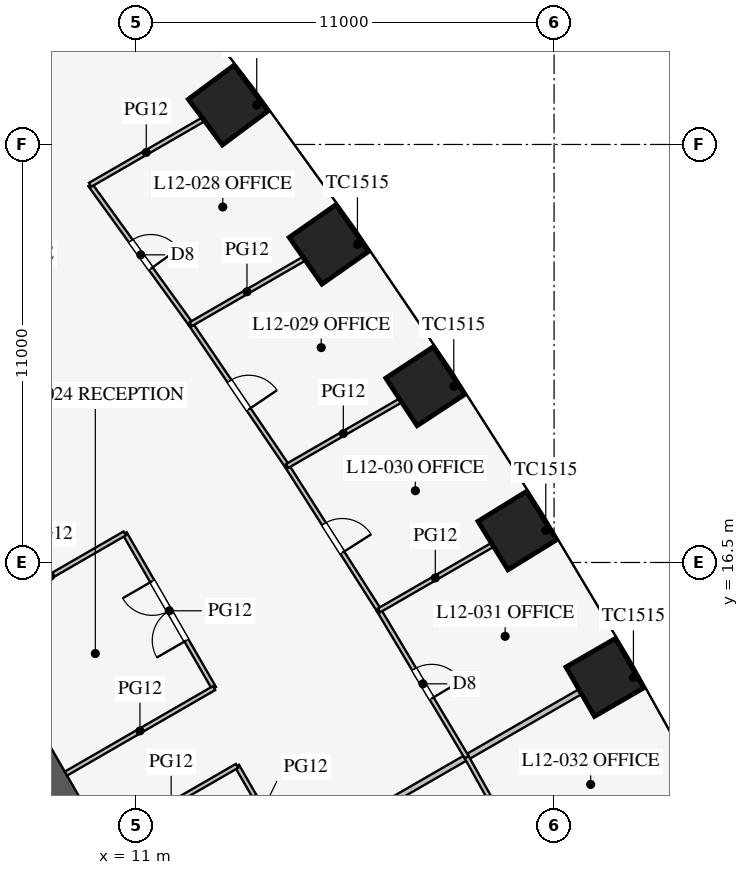
"""IFC4 building model, lengths in metres.
Left out: names, types, materials, properties, quantities, classifications, styles, units other than length and angle.
Written with IfcOpenShell. Run it as: python <this file> out.ifc"""

import sys

from ifc_helpers import new_model, si_unit, direction, frame, frame_2d, origin, origin_2d, place, context, subcontext, project, spatial, rectangle, extrude, element, fill, save


model = new_model("IFC4")
c1 = context("Model", 3, precision=1e-05, world=origin(), true_north=direction((0.0, 1.0)))
c2 = subcontext(c1, "Body", "Model", "MODEL_VIEW")
j1 = project(units=[si_unit("LENGTHUNIT", "METRE"), si_unit("PLANEANGLEUNIT", "RADIAN")], contexts=[c1])
p1 = place(None, origin())
s1 = spatial("IfcSite", under=j1, at=p1, CompositionType="ELEMENT")
p2 = place(p1, origin())
s2 = spatial("IfcBuilding", under=s1, at=p2, CompositionType="ELEMENT")
p3 = place(p2, frame((0.0, 0.0, 54.3)))
s3 = spatial("IfcBuildingStorey", under=s2, at=p3, CompositionType="ELEMENT", Elevation=54.3)
for number, where, z_axis, x_axis in (
    (1, (25.531, 9.544, 0.0), (0.0, 0.0, 1.0), (-0.475, 0.88, 0.0)),
    (2, (23.338, 13.474, 0.0), (0.0, 0.0, 1.0), (-0.5, 0.866, 0.0)),
    (3, (21.031, 17.339, 0.0), (0.0, 0.0, 1.0), (-0.525, 0.851, 0.0)),
    (4, (18.611, 21.137, 0.0), (0.0, 0.0, 1.0), (-0.549, 0.836, 0.0)),
    (5, (16.076, 24.87, 0.0), (0.0, 0.0, 1.0), (-0.574, 0.819, 0.0)),
    (6, (13.426, 28.536, 0.0), (0.0, 0.0, 1.0), (-0.597, 0.802, 0.0)),
):
    element("IfcColumn", number, at=place(p3, frame(where, z_axis=z_axis, x_axis=x_axis)), inside=s3, PredefinedType="COLUMN", context=c2, shape_type="SweptSolid", body=[
        extrude(rectangle(XDim=1.5, YDim=1.5, at=origin_2d()), origin(), (0.0, 0.0, 1.0), 4.2),
    ])
p4 = place(p3, frame((16.743, -3.0, 0.0), z_axis=(0.0, 0.0, 1.0), x_axis=(-0.500002442456, 0.866023993627, 0.0)))
e7 = element("IfcWall", 7, at=p4, inside=s3, PredefinedType="SHEAR", context=c2, shape_type="SweptSolid", body=[
    extrude(rectangle(XDim=21.939, YDim=0.8, at=frame_2d((10.97, 0.0))), origin(), (0.0, 0.0, 1.0), 4.2),
])
p5 = place(p4, frame((17.27, 0.0, 0.0)))
e8 = element("IfcOpeningElement", 8, at=p5, cuts=e7, PredefinedType="OPENING", context=c2, shape_type="SweptSolid", body=[
    extrude(rectangle(XDim=1.2, YDim=2.1, at=frame_2d((0.6, 1.05))), frame((0.0, 0.41, 0.0), z_axis=(0.0, -1.0, 0.0), x_axis=(1.0, 0.0, 0.0)), (0.0, 0.0, 1.0), 0.82),
])
p6 = place(p4, frame((3.47, 0.0, 0.0)))
e9 = element("IfcOpeningElement", 9, at=p6, cuts=e7, PredefinedType="OPENING", context=c2, shape_type="SweptSolid", body=[
    extrude(rectangle(XDim=1.2, YDim=2.1, at=frame_2d((0.6, 1.05))), frame((0.0, 0.41, 0.0), z_axis=(0.0, -1.0, 0.0), x_axis=(1.0, 0.0, 0.0)), (0.0, 0.0, 1.0), 0.82),
])
p7 = place(p3, frame((11.613, 6.705, 0.0), z_axis=(0.0, 0.0, 1.0), x_axis=(0.86602785495, 0.499995754432, 0.0)))
e10 = element("IfcWall", 10, at=p7, inside=s3, PredefinedType="PARTITIONING", context=c2, shape_type="SweptSolid", body=[
    extrude(rectangle(XDim=12.759, YDim=0.15, at=frame_2d((6.379, 0.0))), origin(), (0.0, 0.0, 1.0), 3.2),
])
p8 = place(p3, frame((15.006, 8.808, 0.0), z_axis=(0.0, 0.0, 1.0), x_axis=(-0.500048589285, 0.86599734893, 0.0)))
e11 = element("IfcWall", 11, at=p8, inside=s3, PredefinedType="PARTITIONING", context=c2, shape_type="SweptSolid", body=[
    extrude(rectangle(XDim=2.7, YDim=0.12, at=frame_2d((1.35, 0.0))), origin(), (0.0, 0.0, 1.0), 2.9),
])
p9 = place(p8, frame((0.9, 0.0, 0.15)))
e12 = element("IfcOpeningElement", 12, at=p9, cuts=e11, PredefinedType="OPENING", context=c2, shape_type="SweptSolid", body=[
    extrude(rectangle(XDim=0.9, YDim=2.1, at=frame_2d((0.45, 1.05))), frame((0.0, 0.07, 0.0), z_axis=(0.0, -1.0, 0.0), x_axis=(1.0, 0.0, 0.0)), (0.0, 0.0, 1.0), 0.14),
])
p10 = place(p3, frame((13.052, 13.194, 0.0), z_axis=(0.0, 0.0, 1.0), x_axis=(-0.499977259774, 0.866038532462, 0.0)))
e13 = element("IfcWall", 13, at=p10, inside=s3, PredefinedType="PARTITIONING", context=c2, shape_type="SweptSolid", body=[
    extrude(rectangle(XDim=4.7, YDim=0.12, at=frame_2d((2.35, 0.0))), origin(), (0.0, 0.0, 1.0), 2.9),
])
p11 = place(p10, frame((1.45, 0.0, 0.15)))
e14 = element("IfcOpeningElement", 14, at=p11, cuts=e13, PredefinedType="OPENING", context=c2, shape_type="SweptSolid", body=[
    extrude(rectangle(XDim=1.8, YDim=2.1, at=frame_2d((0.9, 1.05))), frame((0.0, 0.07, 0.0), z_axis=(0.0, -1.0, 0.0), x_axis=(1.0, 0.0, 0.0)), (0.0, 0.0, 1.0), 0.14),
])
p12 = place(p3, frame((10.192, 9.146, 0.0), z_axis=(0.0, 0.0, 1.0), x_axis=(0.866026010844, 0.49999894854, 0.0)))
e15 = element("IfcWall", 15, at=p12, inside=s3, PredefinedType="PARTITIONING", context=c2, shape_type="SweptSolid", body=[
    extrude(rectangle(XDim=4.0, YDim=0.12, at=frame_2d((2.0, 0.0))), origin(), (0.0, 0.0, 1.0), 2.9),
])
p13 = place(p3, frame((9.155, 10.944, 0.0), z_axis=(0.0, 0.0, 1.0), x_axis=(0.866017533419, 0.500013631625, 0.0)))
e16 = element("IfcWall", 16, at=p13, inside=s3, PredefinedType="PARTITIONING", context=c2, shape_type="SweptSolid", body=[
    extrude(rectangle(XDim=4.5, YDim=0.12, at=frame_2d((2.25, 0.0))), origin(), (0.0, 0.0, 1.0), 2.9),
])
p14 = place(p3, frame((6.805, 15.014, 0.0), z_axis=(0.0, 0.0, 1.0), x_axis=(0.866031096941, 0.499990139034, 0.0)))
e17 = element("IfcWall", 17, at=p14, inside=s3, PredefinedType="PARTITIONING", context=c2, shape_type="SweptSolid", body=[
    extrude(rectangle(XDim=4.5, YDim=0.12, at=frame_2d((2.25, 0.0))), origin(), (0.0, 0.0, 1.0), 2.9),
])
p15 = place(p3, frame((19.701, 11.374, 0.0), z_axis=(0.0, 0.0, 1.0), x_axis=(-0.512483962191, 0.858696796604, 0.0)))
e18 = element("IfcWall", 18, at=p15, inside=s3, PredefinedType="PARTITIONING", context=c2, shape_type="SweptSolid", body=[
    extrude(rectangle(XDim=4.5, YDim=0.12, at=frame_2d((2.25, 0.0))), origin(), (0.0, 0.0, 1.0), 2.9),
])
p16 = place(p15, frame((1.8, 0.0, 0.15)))
e19 = element("IfcOpeningElement", 19, at=p16, cuts=e18, PredefinedType="OPENING", context=c2, shape_type="SweptSolid", body=[
    extrude(rectangle(XDim=0.9, YDim=2.1, at=frame_2d((0.45, 1.05))), frame((0.0, 0.07, 0.0), z_axis=(0.0, -1.0, 0.0), x_axis=(1.0, 0.0, 0.0)), (0.0, 0.0, 1.0), 0.14),
])
p17 = place(p3, frame((12.441, 22.771, 0.0), z_axis=(0.0, 0.0, 1.0), x_axis=(-0.585376255171, 0.810761765183, 0.0)))
e20 = element("IfcWall", 20, at=p17, inside=s3, PredefinedType="PARTITIONING", context=c2, shape_type="SweptSolid", body=[
    extrude(rectangle(XDim=4.523, YDim=0.12, at=frame_2d((2.262, 0.0))), origin(), (0.0, 0.0, 1.0), 2.9),
])
p18 = place(p17, frame((1.8, 0.0, 0.15)))
e21 = element("IfcOpeningElement", 21, at=p18, cuts=e20, PredefinedType="OPENING", context=c2, shape_type="SweptSolid", body=[
    extrude(rectangle(XDim=0.9, YDim=2.1, at=frame_2d((0.45, 1.05))), frame((0.0, 0.07, 0.0), z_axis=(0.0, -1.0, 0.0), x_axis=(1.0, 0.0, 0.0)), (0.0, 0.0, 1.0), 0.14),
])
p19 = place(p3, frame((17.395, 15.239, 0.0), z_axis=(0.0, 0.0, 1.0), x_axis=(-0.537243691336, 0.843427066272, 0.0)))
e22 = element("IfcWall", 22, at=p19, inside=s3, PredefinedType="PARTITIONING", context=c2, shape_type="SweptSolid", body=[
    extrude(rectangle(XDim=4.504, YDim=0.12, at=frame_2d((2.252, 0.0))), origin(), (0.0, 0.0, 1.0), 2.9),
])
p20 = place(p19, frame((1.8, 0.0, 0.15)))
e23 = element("IfcOpeningElement", 23, at=p20, cuts=e22, PredefinedType="OPENING", context=c2, shape_type="SweptSolid", body=[
    extrude(rectangle(XDim=0.9, YDim=2.1, at=frame_2d((0.45, 1.05))), frame((0.0, 0.07, 0.0), z_axis=(0.0, -1.0, 0.0), x_axis=(1.0, 0.0, 0.0)), (0.0, 0.0, 1.0), 0.14),
])
p21 = place(p3, frame((14.975, 19.038, 0.0), z_axis=(0.0, 0.0, 1.0), x_axis=(-0.561512004239, 0.827468591002, 0.0)))
e24 = element("IfcWall", 24, at=p21, inside=s3, PredefinedType="PARTITIONING", context=c2, shape_type="SweptSolid", body=[
    extrude(rectangle(XDim=4.512, YDim=0.12, at=frame_2d((2.256, 0.0))), origin(), (0.0, 0.0, 1.0), 2.9),
])
p22 = place(p21, frame((1.8, 0.0, 0.15)))
e25 = element("IfcOpeningElement", 25, at=p22, cuts=e24, PredefinedType="OPENING", context=c2, shape_type="SweptSolid", body=[
    extrude(rectangle(XDim=0.9, YDim=2.1, at=frame_2d((0.45, 1.05))), frame((0.0, 0.07, 0.0), z_axis=(0.0, -1.0, 0.0), x_axis=(1.0, 0.0, 0.0)), (0.0, 0.0, 1.0), 0.14),
])
p23 = place(p3, frame((21.895, 7.445, 0.0), z_axis=(0.0, 0.0, 1.0), x_axis=(-0.487415216275, 0.87317031955, 0.0)))
e26 = element("IfcWall", 26, at=p23, inside=s3, PredefinedType="PARTITIONING", context=c2, shape_type="SweptSolid", body=[
    extrude(rectangle(XDim=4.5, YDim=0.12, at=frame_2d((2.25, 0.0))), origin(), (0.0, 0.0, 1.0), 2.9),
])
p24 = place(p23, frame((1.8, 0.0, 0.15)))
e27 = element("IfcOpeningElement", 27, at=p24, cuts=e26, PredefinedType="OPENING", context=c2, shape_type="SweptSolid", body=[
    extrude(rectangle(XDim=0.9, YDim=2.1, at=frame_2d((0.45, 1.05))), frame((0.0, 0.07, 0.0), z_axis=(0.0, -1.0, 0.0), x_axis=(1.0, 0.0, 0.0)), (0.0, 0.0, 1.0), 0.14),
])
p25 = place(p3, frame((12.441, 22.771, 0.0), z_axis=(0.0, 0.0, 1.0), x_axis=(0.866016478054, 0.500015459501, 0.0)))
e28 = element("IfcWall", 28, at=p25, inside=s3, PredefinedType="PARTITIONING", context=c2, shape_type="SweptSolid", body=[
    extrude(rectangle(XDim=3.414, YDim=0.12, at=frame_2d((1.707, 0.0))), origin(), (0.0, 0.0, 1.0), 2.9),
])
p26 = place(p3, frame((9.793, 26.439, 0.0), z_axis=(0.0, 0.0, 1.0), x_axis=(0.866040105854, 0.499974534403, 0.0)))
e29 = element("IfcWall", 29, at=p26, inside=s3, PredefinedType="PARTITIONING", context=c2, shape_type="SweptSolid", body=[
    extrude(rectangle(XDim=3.409, YDim=0.12, at=frame_2d((1.705, 0.0))), origin(), (0.0, 0.0, 1.0), 2.9),
])
p27 = place(p3, frame((17.395, 15.239, 0.0), z_axis=(0.0, 0.0, 1.0), x_axis=(0.866015553834, 0.500017060227, 0.0)))
e30 = element("IfcWall", 30, at=p27, inside=s3, PredefinedType="PARTITIONING", context=c2, shape_type="SweptSolid", body=[
    extrude(rectangle(XDim=3.419, YDim=0.12, at=frame_2d((1.71, 0.0))), origin(), (0.0, 0.0, 1.0), 2.9),
])
p28 = place(p3, frame((14.975, 19.038, 0.0), z_axis=(0.0, 0.0, 1.0), x_axis=(0.866014265796, 0.500019291066, 0.0)))
e31 = element("IfcWall", 31, at=p28, inside=s3, PredefinedType="PARTITIONING", context=c2, shape_type="SweptSolid", body=[
    extrude(rectangle(XDim=3.417, YDim=0.12, at=frame_2d((1.708, 0.0))), origin(), (0.0, 0.0, 1.0), 2.9),
])
p29 = place(p11, origin())
e32 = element("IfcDoor", 32, at=p29, inside=s3, OperationType="DOUBLE_DOOR_SINGLE_SWING", PredefinedType="DOOR", context=c2, shape_type="SweptSolid", body=[
    extrude(rectangle(XDim=1.8, YDim=2.1, at=frame_2d((0.9, 1.05))), frame((0.0, 0.025, 0.0), z_axis=(0.0, -1.0, 0.0), x_axis=(1.0, 0.0, 0.0)), (0.0, 0.0, 1.0), 0.05),
])
fill(e14, e32)
p30 = place(p9, origin())
e33 = element("IfcDoor", 33, at=p30, inside=s3, OperationType="SINGLE_SWING_LEFT", PredefinedType="DOOR", context=c2, shape_type="SweptSolid", body=[
    extrude(rectangle(XDim=0.9, YDim=2.1, at=frame_2d((0.45, 1.05))), frame((0.0, 0.025, 0.0), z_axis=(0.0, -1.0, 0.0), x_axis=(1.0, 0.0, 0.0)), (0.0, 0.0, 1.0), 0.05),
])
fill(e12, e33)
p31 = place(p18, frame((0.9, 0.0, 0.0), z_axis=(0.0, 0.0, 1.0), x_axis=(-1.0, 0.0, 0.0)))
e34 = element("IfcDoor", 34, at=p31, inside=s3, OperationType="SINGLE_SWING_RIGHT", PredefinedType="DOOR", context=c2, shape_type="SweptSolid", body=[
    extrude(rectangle(XDim=0.9, YDim=2.1, at=frame_2d((0.45, 1.05))), frame((0.0, 0.025, 0.0), z_axis=(0.0, -1.0, 0.0), x_axis=(1.0, 0.0, 0.0)), (0.0, 0.0, 1.0), 0.05),
])
fill(e21, e34)
p32 = place(p22, frame((0.9, 0.0, 0.0), z_axis=(0.0, 0.0, 1.0), x_axis=(-1.0, 0.0, 0.0)))
e35 = element("IfcDoor", 35, at=p32, inside=s3, OperationType="SINGLE_SWING_RIGHT", PredefinedType="DOOR", context=c2, shape_type="SweptSolid", body=[
    extrude(rectangle(XDim=0.9, YDim=2.1, at=frame_2d((0.45, 1.05))), frame((0.0, 0.025, 0.0), z_axis=(0.0, -1.0, 0.0), x_axis=(1.0, 0.0, 0.0)), (0.0, 0.0, 1.0), 0.05),
])
fill(e25, e35)
p33 = place(p20, frame((0.9, 0.0, 0.0), z_axis=(0.0, 0.0, 1.0), x_axis=(-1.0, 0.0, 0.0)))
e36 = element("IfcDoor", 36, at=p33, inside=s3, OperationType="SINGLE_SWING_RIGHT", PredefinedType="DOOR", context=c2, shape_type="SweptSolid", body=[
    extrude(rectangle(XDim=0.9, YDim=2.1, at=frame_2d((0.45, 1.05))), frame((0.0, 0.025, 0.0), z_axis=(0.0, -1.0, 0.0), x_axis=(1.0, 0.0, 0.0)), (0.0, 0.0, 1.0), 0.05),
])
fill(e23, e36)
p34 = place(p16, frame((0.9, 0.0, 0.0), z_axis=(0.0, 0.0, 1.0), x_axis=(-1.0, 0.0, 0.0)))
e37 = element("IfcDoor", 37, at=p34, inside=s3, OperationType="SINGLE_SWING_RIGHT", PredefinedType="DOOR", context=c2, shape_type="SweptSolid", body=[
    extrude(rectangle(XDim=0.9, YDim=2.1, at=frame_2d((0.45, 1.05))), frame((0.0, 0.025, 0.0), z_axis=(0.0, -1.0, 0.0), x_axis=(1.0, 0.0, 0.0)), (0.0, 0.0, 1.0), 0.05),
])
fill(e19, e37)
save(model, sys.argv[1])
